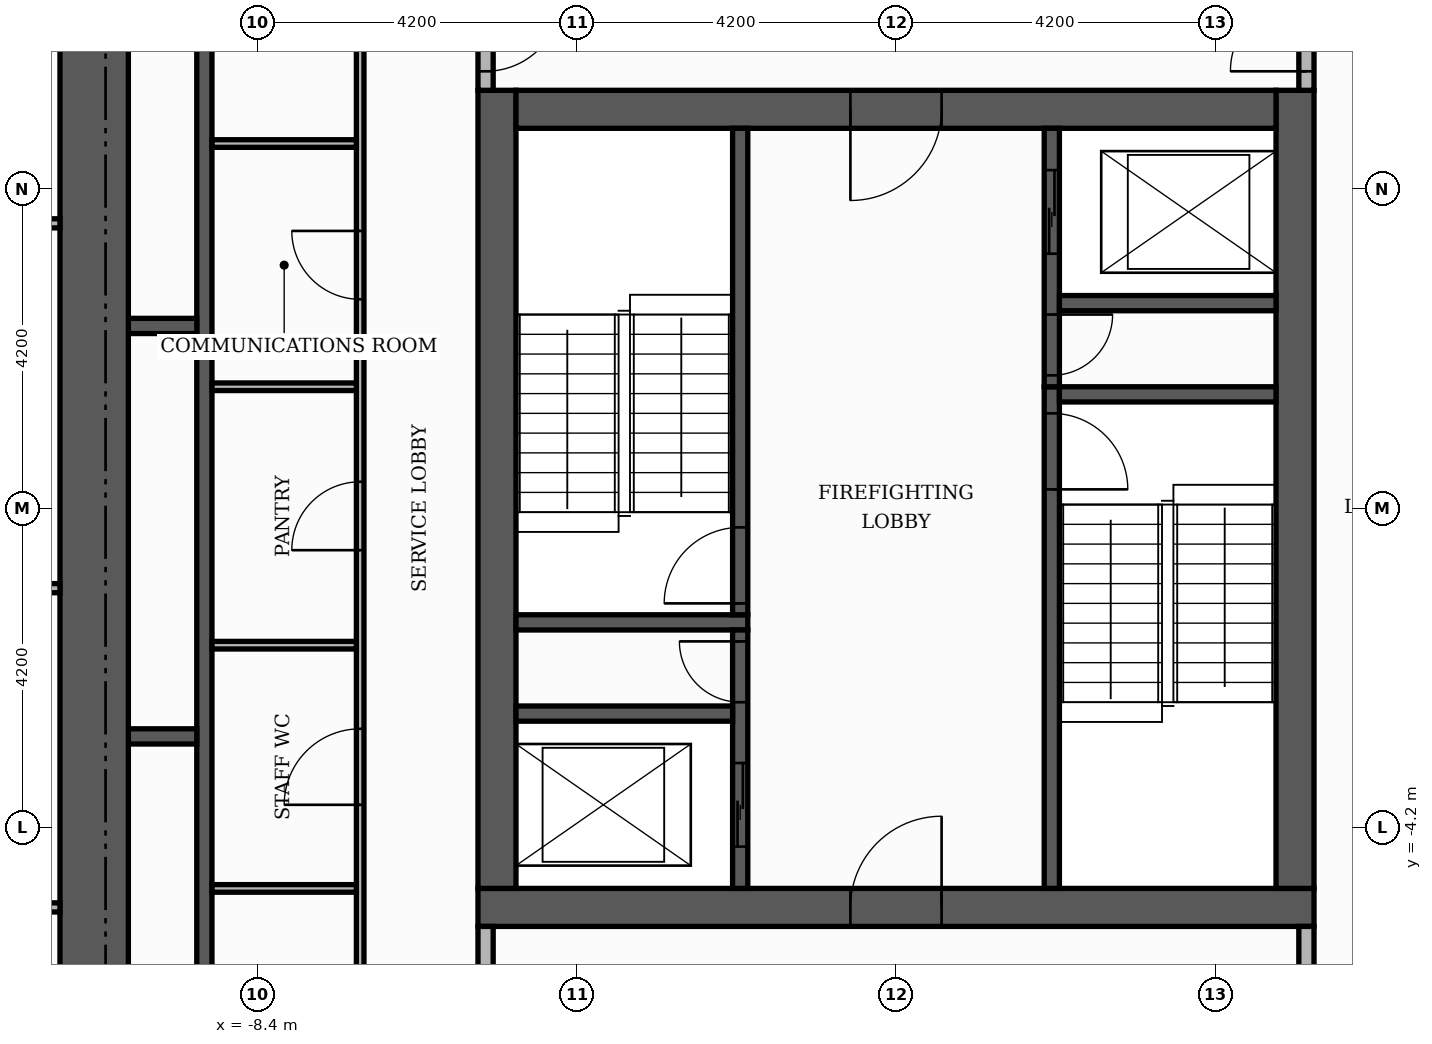
"""IFC4 building model, lengths in metres.
Left out: names, types, materials, properties, quantities, classifications, styles, units other than length and angle.
Written with IfcOpenShell. Run it as: python <this file> out.ifc"""

import sys

from ifc_helpers import new_model, si_unit, direction, frame, frame_2d, origin, place, context, subcontext, project, spatial, rectangle, extrude, element, fill, save


model = new_model("IFC4")
c1 = context("Model", 3, precision=1e-05, world=origin(), true_north=direction((0.0, 1.0)))
c2 = subcontext(c1, "Body", "Model", "MODEL_VIEW")
j1 = project(units=[si_unit("LENGTHUNIT", "METRE"), si_unit("PLANEANGLEUNIT", "RADIAN")], contexts=[c1])
p1 = place(None, origin())
s1 = spatial("IfcSite", under=j1, at=p1, CompositionType="ELEMENT")
p2 = place(p1, origin())
s2 = spatial("IfcBuilding", under=s1, at=p2, CompositionType="ELEMENT")
p3 = place(p2, frame((0.0, 0.0, 244.5)))
s3 = spatial("IfcBuildingStorey", under=s2, at=p3, CompositionType="ELEMENT", Elevation=244.5)
p4 = place(p3, frame((-5.5, -5.25, 0.0), z_axis=(0.0, 0.0, 1.0), x_axis=(1.0, 0.0, 0.0)))
e1 = element("IfcWall", 1, at=p4, inside=s3, PredefinedType="SHEAR", context=c2, shape_type="SweptSolid", body=[
    extrude(rectangle(XDim=11.0, YDim=0.5, at=frame_2d((5.5, 0.0))), origin(), (0.0, 0.0, 1.0), 3.48),
])
p5 = place(p4, frame((4.9, 0.0, 0.0)))
e2 = element("IfcOpeningElement", 2, at=p5, cuts=e1, PredefinedType="OPENING", context=c2, shape_type="SweptSolid", body=[
    extrude(rectangle(XDim=1.2, YDim=2.1, at=frame_2d((0.6, 1.05))), frame((0.0, 0.26, 0.0), z_axis=(0.0, -1.0, 0.0), x_axis=(1.0, 0.0, 0.0)), (0.0, 0.0, 1.0), 0.52),
])
for number, where, z_axis, x_axis in (
    (3, (-5.25, -5.0, 0.0), (0.0, 0.0, 1.0), (0.0, 1.0, 0.0)),
    (4, (5.25, -5.0, 0.0), (0.0, 0.0, 1.0), (0.0, 1.0, 0.0)),
):
    element("IfcWall", number, at=place(p3, frame(where, z_axis=z_axis, x_axis=x_axis)), inside=s3, PredefinedType="SHEAR", context=c2, shape_type="SweptSolid", body=[
        extrude(rectangle(XDim=10.5, YDim=0.5, at=frame_2d((5.25, 0.0))), origin(), (0.0, 0.0, 1.0), 3.48),
    ])
p6 = place(p3, frame((-5.0, 5.25, 0.0), z_axis=(0.0, 0.0, 1.0), x_axis=(1.0, 0.0, 0.0)))
e5 = element("IfcWall", 5, at=p6, inside=s3, PredefinedType="SHEAR", context=c2, shape_type="SweptSolid", body=[
    extrude(rectangle(XDim=10.0, YDim=0.5, at=frame_2d((5.0, 0.0))), origin(), (0.0, 0.0, 1.0), 3.48),
])
p7 = place(p6, frame((4.4, 0.0, 0.0)))
e6 = element("IfcOpeningElement", 6, at=p7, cuts=e5, PredefinedType="OPENING", context=c2, shape_type="SweptSolid", body=[
    extrude(rectangle(XDim=1.2, YDim=2.1, at=frame_2d((0.6, 1.05))), frame((0.0, 0.26, 0.0), z_axis=(0.0, -1.0, 0.0), x_axis=(1.0, 0.0, 0.0)), (0.0, 0.0, 1.0), 0.52),
])
p8 = place(p3, frame((2.05, -5.0, 0.0), z_axis=(0.0, 0.0, 1.0), x_axis=(0.0, 1.0, 0.0)))
e7 = element("IfcWall", 7, at=p8, inside=s3, PredefinedType="SHEAR", context=c2, shape_type="SweptSolid", body=[
    extrude(rectangle(XDim=6.6, YDim=0.2, at=frame_2d((3.3, 0.0))), origin(), (0.0, 0.0, 1.0), 3.48),
])
p9 = place(p8, frame((5.25, 0.0, 0.0)))
e8 = element("IfcOpeningElement", 8, at=p9, cuts=e7, PredefinedType="OPENING", context=c2, shape_type="SweptSolid", body=[
    extrude(rectangle(XDim=1.0, YDim=2.1, at=frame_2d((0.5, 1.05))), frame((0.0, 0.11, 0.0), z_axis=(0.0, -1.0, 0.0), x_axis=(1.0, 0.0, 0.0)), (0.0, 0.0, 1.0), 0.22),
])
p10 = place(p3, frame((-5.0, -1.5, 0.0), z_axis=(0.0, 0.0, 1.0), x_axis=(1.0, 0.0, 0.0)))
e9 = element("IfcWall", 9, at=p10, inside=s3, PredefinedType="SHEAR", context=c2, shape_type="SweptSolid", body=[
    extrude(rectangle(XDim=3.05, YDim=0.2, at=frame_2d((1.525, 0.0))), origin(), (0.0, 0.0, 1.0), 3.48),
])
p11 = place(p3, frame((-2.05, -1.4, 0.0), z_axis=(0.0, 0.0, 1.0), x_axis=(0.0, 1.0, 0.0)))
e10 = element("IfcWall", 10, at=p11, inside=s3, PredefinedType="SHEAR", context=c2, shape_type="SweptSolid", body=[
    extrude(rectangle(XDim=6.4, YDim=0.2, at=frame_2d((3.2, 0.0))), origin(), (0.0, 0.0, 1.0), 3.48),
])
p12 = place(p11, frame((0.15, 0.0, 0.0)))
e11 = element("IfcOpeningElement", 11, at=p12, cuts=e10, PredefinedType="OPENING", context=c2, shape_type="SweptSolid", body=[
    extrude(rectangle(XDim=1.0, YDim=2.1, at=frame_2d((0.5, 1.05))), frame((0.0, 0.11, 0.0), z_axis=(0.0, -1.0, 0.0), x_axis=(1.0, 0.0, 0.0)), (0.0, 0.0, 1.0), 0.22),
])
p13 = place(p3, frame((2.15, 1.5, 0.0), z_axis=(0.0, 0.0, 1.0), x_axis=(1.0, 0.0, 0.0)))
e12 = element("IfcWall", 12, at=p13, inside=s3, PredefinedType="SHEAR", context=c2, shape_type="SweptSolid", body=[
    extrude(rectangle(XDim=2.85, YDim=0.2, at=frame_2d((1.425, 0.0))), origin(), (0.0, 0.0, 1.0), 3.48),
])
p14 = place(p3, frame((-9.1, -8.2, 0.0), z_axis=(0.0, 0.0, 1.0), x_axis=(0.0, 1.0, 0.0)))
e13 = element("IfcWall", 13, at=p14, inside=s3, PredefinedType="SHEAR", context=c2, shape_type="SweptSolid", body=[
    extrude(rectangle(XDim=16.4, YDim=0.2, at=frame_2d((8.2, 0.0))), origin(), (0.0, 0.0, 1.0), 3.48),
])
p15 = place(p3, frame((-2.05, -5.0, 0.0), z_axis=(0.0, 0.0, 1.0), x_axis=(0.0, 1.0, 0.0)))
e14 = element("IfcWall", 14, at=p15, inside=s3, PredefinedType="SHEAR", context=c2, shape_type="SweptSolid", body=[
    extrude(rectangle(XDim=3.4, YDim=0.2, at=frame_2d((1.7, 0.0))), origin(), (0.0, 0.0, 1.0), 3.48),
])
p16 = place(p15, frame((0.55, 0.0, 0.0)))
e15 = element("IfcOpeningElement", 15, at=p16, cuts=e14, PredefinedType="OPENING", context=c2, shape_type="SweptSolid", body=[
    extrude(rectangle(XDim=1.1, YDim=2.1, at=frame_2d((0.55, 1.05))), frame((0.0, 0.11, 0.0), z_axis=(0.0, -1.0, 0.0), x_axis=(1.0, 0.0, 0.0)), (0.0, 0.0, 1.0), 0.22),
])
p17 = place(p15, frame((2.45, 0.0, 0.0)))
e16 = element("IfcOpeningElement", 16, at=p17, cuts=e14, PredefinedType="OPENING", context=c2, shape_type="SweptSolid", body=[
    extrude(rectangle(XDim=0.8, YDim=2.1, at=frame_2d((0.4, 1.05))), frame((0.0, 0.11, 0.0), z_axis=(0.0, -1.0, 0.0), x_axis=(1.0, 0.0, 0.0)), (0.0, 0.0, 1.0), 0.22),
])
p18 = place(p3, frame((-10.1, -3.0, 0.0), z_axis=(0.0, 0.0, 1.0), x_axis=(1.0, 0.0, 0.0)))
e17 = element("IfcWall", 17, at=p18, inside=s3, PredefinedType="SHEAR", context=c2, shape_type="SweptSolid", body=[
    extrude(rectangle(XDim=0.9, YDim=0.2, at=frame_2d((0.45, 0.0))), origin(), (0.0, 0.0, 1.0), 3.48),
])
p19 = place(p3, frame((-5.0, -2.7, 0.0), z_axis=(0.0, 0.0, 1.0), x_axis=(1.0, 0.0, 0.0)))
e18 = element("IfcWall", 18, at=p19, inside=s3, PredefinedType="SHEAR", context=c2, shape_type="SweptSolid", body=[
    extrude(rectangle(XDim=2.85, YDim=0.2, at=frame_2d((1.425, 0.0))), origin(), (0.0, 0.0, 1.0), 3.48),
])
p20 = place(p3, frame((2.05, 1.6, 0.0), z_axis=(0.0, 0.0, 1.0), x_axis=(0.0, 1.0, 0.0)))
e19 = element("IfcWall", 19, at=p20, inside=s3, PredefinedType="SHEAR", context=c2, shape_type="SweptSolid", body=[
    extrude(rectangle(XDim=3.4, YDim=0.2, at=frame_2d((1.7, 0.0))), origin(), (0.0, 0.0, 1.0), 3.48),
])
p21 = place(p20, frame((1.75, 0.0, 0.0)))
e20 = element("IfcOpeningElement", 20, at=p21, cuts=e19, PredefinedType="OPENING", context=c2, shape_type="SweptSolid", body=[
    extrude(rectangle(XDim=1.1, YDim=2.1, at=frame_2d((0.55, 1.05))), frame((0.0, 0.11, 0.0), z_axis=(0.0, -1.0, 0.0), x_axis=(1.0, 0.0, 0.0)), (0.0, 0.0, 1.0), 0.22),
])
p22 = place(p20, frame((0.15, 0.0, 0.0)))
e21 = element("IfcOpeningElement", 21, at=p22, cuts=e19, PredefinedType="OPENING", context=c2, shape_type="SweptSolid", body=[
    extrude(rectangle(XDim=0.8, YDim=2.1, at=frame_2d((0.4, 1.05))), frame((0.0, 0.11, 0.0), z_axis=(0.0, -1.0, 0.0), x_axis=(1.0, 0.0, 0.0)), (0.0, 0.0, 1.0), 0.22),
])
p23 = place(p3, frame((-10.1, 2.4, 0.0), z_axis=(0.0, 0.0, 1.0), x_axis=(1.0, 0.0, 0.0)))
e22 = element("IfcWall", 22, at=p23, inside=s3, PredefinedType="SHEAR", context=c2, shape_type="SweptSolid", body=[
    extrude(rectangle(XDim=0.9, YDim=0.2, at=frame_2d((0.45, 0.0))), origin(), (0.0, 0.0, 1.0), 3.48),
])
p24 = place(p3, frame((2.15, 2.7, 0.0), z_axis=(0.0, 0.0, 1.0), x_axis=(1.0, 0.0, 0.0)))
e23 = element("IfcWall", 23, at=p24, inside=s3, PredefinedType="SHEAR", context=c2, shape_type="SweptSolid", body=[
    extrude(rectangle(XDim=2.85, YDim=0.2, at=frame_2d((1.425, 0.0))), origin(), (0.0, 0.0, 1.0), 3.48),
])
p25 = place(p3, frame((-10.55, -10.1, 0.0), z_axis=(0.0, 0.0, 1.0), x_axis=(0.0, 1.0, 0.0)))
e24 = element("IfcWall", 24, at=p25, inside=s3, PredefinedType="SHEAR", context=c2, shape_type="SweptSolid", body=[
    extrude(rectangle(XDim=20.2, YDim=0.9, at=frame_2d((10.1, 0.0))), origin(), (0.0, 0.0, 1.0), 3.48),
])
p26 = place(p3, frame((-5.4, -10.1, 0.0), z_axis=(0.0, 0.0, 1.0), x_axis=(0.0, 1.0, 0.0)))
e25 = element("IfcWall", 25, at=p26, inside=s3, PredefinedType="PARTITIONING", context=c2, shape_type="SweptSolid", body=[
    extrude(rectangle(XDim=4.6, YDim=0.2, at=frame_2d((2.3, 0.0))), origin(), (0.0, 0.0, 1.0), 3.48),
])
p27 = place(p26, frame((2.9, 0.0, 0.0)))
e26 = element("IfcOpeningElement", 26, at=p27, cuts=e25, PredefinedType="OPENING", context=c2, shape_type="SweptSolid", body=[
    extrude(rectangle(XDim=1.0, YDim=2.1, at=frame_2d((0.5, 1.05))), frame((0.0, 0.11, 0.0), z_axis=(0.0, -1.0, 0.0), x_axis=(1.0, 0.0, 0.0)), (0.0, 0.0, 1.0), 0.22),
])
p28 = place(p3, frame((5.4, -10.1, 0.0), z_axis=(0.0, 0.0, 1.0), x_axis=(0.0, 1.0, 0.0)))
e27 = element("IfcWall", 27, at=p28, inside=s3, PredefinedType="PARTITIONING", context=c2, shape_type="SweptSolid", body=[
    extrude(rectangle(XDim=4.6, YDim=0.2, at=frame_2d((2.3, 0.0))), origin(), (0.0, 0.0, 1.0), 3.48),
])
p29 = place(p28, frame((2.9, 0.0, 0.0)))
e28 = element("IfcOpeningElement", 28, at=p29, cuts=e27, PredefinedType="OPENING", context=c2, shape_type="SweptSolid", body=[
    extrude(rectangle(XDim=1.0, YDim=2.1, at=frame_2d((0.5, 1.05))), frame((0.0, 0.11, 0.0), z_axis=(0.0, -1.0, 0.0), x_axis=(1.0, 0.0, 0.0)), (0.0, 0.0, 1.0), 0.22),
])
p30 = place(p3, frame((-7.05, -8.2, 0.0), z_axis=(0.0, 0.0, 1.0), x_axis=(0.0, 1.0, 0.0)))
e29 = element("IfcWall", 29, at=p30, inside=s3, PredefinedType="PARTITIONING", context=c2, shape_type="SweptSolid", body=[
    extrude(rectangle(XDim=16.4, YDim=0.1, at=frame_2d((8.2, 0.0))), origin(), (0.0, 0.0, 1.0), 3.48),
])
p31 = place(p30, frame((1.15, 0.0, 0.0)))
e30 = element("IfcOpeningElement", 30, at=p31, cuts=e29, PredefinedType="OPENING", context=c2, shape_type="SweptSolid", body=[
    extrude(rectangle(XDim=0.9, YDim=2.1, at=frame_2d((0.45, 1.05))), frame((0.0, 0.06, 0.0), z_axis=(0.0, -1.0, 0.0), x_axis=(1.0, 0.0, 0.0)), (0.0, 0.0, 1.0), 0.12),
])
p32 = place(p30, frame((4.3, 0.0, 0.0)))
e31 = element("IfcOpeningElement", 31, at=p32, cuts=e29, PredefinedType="OPENING", context=c2, shape_type="SweptSolid", body=[
    extrude(rectangle(XDim=1.0, YDim=2.1, at=frame_2d((0.5, 1.05))), frame((0.0, 0.06, 0.0), z_axis=(0.0, -1.0, 0.0), x_axis=(1.0, 0.0, 0.0)), (0.0, 0.0, 1.0), 0.12),
])
p33 = place(p30, frame((7.65, 0.0, 0.0)))
e32 = element("IfcOpeningElement", 32, at=p33, cuts=e29, PredefinedType="OPENING", context=c2, shape_type="SweptSolid", body=[
    extrude(rectangle(XDim=0.9, YDim=2.1, at=frame_2d((0.45, 1.05))), frame((0.0, 0.06, 0.0), z_axis=(0.0, -1.0, 0.0), x_axis=(1.0, 0.0, 0.0)), (0.0, 0.0, 1.0), 0.12),
])
p34 = place(p30, frame((10.95, 0.0, 0.0)))
e33 = element("IfcOpeningElement", 33, at=p34, cuts=e29, PredefinedType="OPENING", context=c2, shape_type="SweptSolid", body=[
    extrude(rectangle(XDim=0.9, YDim=2.1, at=frame_2d((0.45, 1.05))), frame((0.0, 0.06, 0.0), z_axis=(0.0, -1.0, 0.0), x_axis=(1.0, 0.0, 0.0)), (0.0, 0.0, 1.0), 0.12),
])
p35 = place(p30, frame((14.25, 0.0, 0.0)))
e34 = element("IfcOpeningElement", 34, at=p35, cuts=e29, PredefinedType="OPENING", context=c2, shape_type="SweptSolid", body=[
    extrude(rectangle(XDim=0.9, YDim=2.1, at=frame_2d((0.45, 1.05))), frame((0.0, 0.06, 0.0), z_axis=(0.0, -1.0, 0.0), x_axis=(1.0, 0.0, 0.0)), (0.0, 0.0, 1.0), 0.12),
])
for number, where, z_axis, x_axis in (
    (35, (-9.0, -5.0, 0.0), (0.0, 0.0, 1.0), (1.0, 0.0, 0.0)),
    (36, (-9.0, -1.8, 0.0), (0.0, 0.0, 1.0), (1.0, 0.0, 0.0)),
    (37, (-9.0, 1.6, 0.0), (0.0, 0.0, 1.0), (1.0, 0.0, 0.0)),
    (38, (-9.0, 4.8, 0.0), (0.0, 0.0, 1.0), (1.0, 0.0, 0.0)),
):
    element("IfcWall", number, at=place(p3, frame(where, z_axis=z_axis, x_axis=x_axis)), inside=s3, PredefinedType="PARTITIONING", context=c2, shape_type="SweptSolid", body=[
        extrude(rectangle(XDim=1.9, YDim=0.1, at=frame_2d((0.95, 0.0))), origin(), (0.0, 0.0, 1.0), 3.48),
    ])
p36 = place(p3, frame((-5.4, 5.5, 0.0), z_axis=(0.0, 0.0, 1.0), x_axis=(0.0, 1.0, 0.0)))
e39 = element("IfcWall", 39, at=p36, inside=s3, PredefinedType="PARTITIONING", context=c2, shape_type="SweptSolid", body=[
    extrude(rectangle(XDim=1.55, YDim=0.2, at=frame_2d((0.775, 0.0))), origin(), (0.0, 0.0, 1.0), 3.48),
])
p37 = place(p36, frame((0.25, 0.0, 0.0)))
e40 = element("IfcOpeningElement", 40, at=p37, cuts=e39, PredefinedType="OPENING", context=c2, shape_type="SweptSolid", body=[
    extrude(rectangle(XDim=1.0, YDim=2.1, at=frame_2d((0.5, 1.05))), frame((0.0, 0.11, 0.0), z_axis=(0.0, -1.0, 0.0), x_axis=(1.0, 0.0, 0.0)), (0.0, 0.0, 1.0), 0.22),
])
p38 = place(p3, frame((5.4, 5.5, 0.0), z_axis=(0.0, 0.0, 1.0), x_axis=(0.0, 1.0, 0.0)))
e41 = element("IfcWall", 41, at=p38, inside=s3, PredefinedType="PARTITIONING", context=c2, shape_type="SweptSolid", body=[
    extrude(rectangle(XDim=4.6, YDim=0.2, at=frame_2d((2.3, 0.0))), origin(), (0.0, 0.0, 1.0), 3.48),
])
p39 = place(p38, frame((0.25, 0.0, 0.0)))
e42 = element("IfcOpeningElement", 42, at=p39, cuts=e41, PredefinedType="OPENING", context=c2, shape_type="SweptSolid", body=[
    extrude(rectangle(XDim=1.0, YDim=2.1, at=frame_2d((0.5, 1.05))), frame((0.0, 0.11, 0.0), z_axis=(0.0, -1.0, 0.0), x_axis=(1.0, 0.0, 0.0)), (0.0, 0.0, 1.0), 0.22),
])
for number, where, z_axis, x_axis in (
    (43, (-18.32, -5.25, 0.0), (0.0, 0.0, 1.0), (1.0, 0.0, 0.0)),
    (44, (-18.32, -1.05, 0.0), (0.0, 0.0, 1.0), (1.0, 0.0, 0.0)),
    (45, (-18.32, 3.75, 0.0), (0.0, 0.0, 1.0), (1.0, 0.0, 0.0)),
):
    element("IfcWall", number, at=place(p3, frame(where, z_axis=z_axis, x_axis=x_axis)), inside=s3, PredefinedType="PARTITIONING", context=c2, shape_type="SweptSolid", body=[
        extrude(rectangle(XDim=7.32, YDim=0.12, at=frame_2d((3.66, 0.0))), origin(), (0.0, 0.0, 1.0), 3.48),
    ])
p40 = place(p21, origin())
e46 = element("IfcDoor", 46, at=p40, inside=s3, OperationType="SLIDING_TO_LEFT", PredefinedType="DOOR", context=c2, shape_type="SweptSolid", body=[
    extrude(rectangle(XDim=1.1, YDim=2.1, at=frame_2d((0.55, 1.05))), frame((0.0, 0.025, 0.0), z_axis=(0.0, -1.0, 0.0), x_axis=(1.0, 0.0, 0.0)), (0.0, 0.0, 1.0), 0.05),
])
fill(e20, e46)
p41 = place(p16, origin())
e47 = element("IfcDoor", 47, at=p41, inside=s3, OperationType="SLIDING_TO_LEFT", PredefinedType="DOOR", context=c2, shape_type="SweptSolid", body=[
    extrude(rectangle(XDim=1.1, YDim=2.1, at=frame_2d((0.55, 1.05))), frame((0.0, 0.025, 0.0), z_axis=(0.0, -1.0, 0.0), x_axis=(1.0, 0.0, 0.0)), (0.0, 0.0, 1.0), 0.05),
])
fill(e15, e47)
p42 = place(p12, origin())
e48 = element("IfcDoor", 48, at=p42, inside=s3, OperationType="SINGLE_SWING_LEFT", PredefinedType="DOOR", context=c2, shape_type="SweptSolid", body=[
    extrude(rectangle(XDim=1.0, YDim=2.1, at=frame_2d((0.5, 1.05))), frame((0.0, 0.025, 0.0), z_axis=(0.0, -1.0, 0.0), x_axis=(1.0, 0.0, 0.0)), (0.0, 0.0, 1.0), 0.05),
])
fill(e11, e48)
p43 = place(p9, frame((1.0, 0.0, 0.0), z_axis=(0.0, 0.0, 1.0), x_axis=(-1.0, 0.0, 0.0)))
e49 = element("IfcDoor", 49, at=p43, inside=s3, OperationType="SINGLE_SWING_LEFT", PredefinedType="DOOR", context=c2, shape_type="SweptSolid", body=[
    extrude(rectangle(XDim=1.0, YDim=2.1, at=frame_2d((0.5, 1.05))), frame((0.0, 0.025, 0.0), z_axis=(0.0, -1.0, 0.0), x_axis=(1.0, 0.0, 0.0)), (0.0, 0.0, 1.0), 0.05),
])
fill(e8, e49)
p44 = place(p22, frame((0.8, 0.0, 0.0), z_axis=(0.0, 0.0, 1.0), x_axis=(-1.0, 0.0, 0.0)))
e50 = element("IfcDoor", 50, at=p44, inside=s3, OperationType="SINGLE_SWING_RIGHT", PredefinedType="DOOR", context=c2, shape_type="SweptSolid", body=[
    extrude(rectangle(XDim=0.8, YDim=2.1, at=frame_2d((0.4, 1.05))), frame((0.0, 0.025, 0.0), z_axis=(0.0, -1.0, 0.0), x_axis=(1.0, 0.0, 0.0)), (0.0, 0.0, 1.0), 0.05),
])
fill(e21, e50)
p45 = place(p17, origin())
e51 = element("IfcDoor", 51, at=p45, inside=s3, OperationType="SINGLE_SWING_RIGHT", PredefinedType="DOOR", context=c2, shape_type="SweptSolid", body=[
    extrude(rectangle(XDim=0.8, YDim=2.1, at=frame_2d((0.4, 1.05))), frame((0.0, 0.025, 0.0), z_axis=(0.0, -1.0, 0.0), x_axis=(1.0, 0.0, 0.0)), (0.0, 0.0, 1.0), 0.05),
])
fill(e16, e51)
p46 = place(p7, frame((1.2, 0.0, 0.0), z_axis=(0.0, 0.0, 1.0), x_axis=(-1.0, 0.0, 0.0)))
e52 = element("IfcDoor", 52, at=p46, inside=s3, OperationType="SINGLE_SWING_LEFT", PredefinedType="DOOR", context=c2, shape_type="SweptSolid", body=[
    extrude(rectangle(XDim=1.2, YDim=2.1, at=frame_2d((0.6, 1.05))), frame((0.0, 0.025, 0.0), z_axis=(0.0, -1.0, 0.0), x_axis=(1.0, 0.0, 0.0)), (0.0, 0.0, 1.0), 0.05),
])
fill(e6, e52)
p47 = place(p5, origin())
e53 = element("IfcDoor", 53, at=p47, inside=s3, OperationType="SINGLE_SWING_RIGHT", PredefinedType="DOOR", context=c2, shape_type="SweptSolid", body=[
    extrude(rectangle(XDim=1.2, YDim=2.1, at=frame_2d((0.6, 1.05))), frame((0.0, 0.025, 0.0), z_axis=(0.0, -1.0, 0.0), x_axis=(1.0, 0.0, 0.0)), (0.0, 0.0, 1.0), 0.05),
])
fill(e2, e53)
p48 = place(p37, frame((1.0, 0.0, 0.0), z_axis=(0.0, 0.0, 1.0), x_axis=(-1.0, 0.0, 0.0)))
e54 = element("IfcDoor", 54, at=p48, inside=s3, OperationType="SINGLE_SWING_RIGHT", PredefinedType="DOOR", context=c2, shape_type="SweptSolid", body=[
    extrude(rectangle(XDim=1.0, YDim=2.1, at=frame_2d((0.5, 1.05))), frame((0.0, 0.025, 0.0), z_axis=(0.0, -1.0, 0.0), x_axis=(1.0, 0.0, 0.0)), (0.0, 0.0, 1.0), 0.05),
])
fill(e40, e54)
p49 = place(p39, origin())
e55 = element("IfcDoor", 55, at=p49, inside=s3, OperationType="SINGLE_SWING_LEFT", PredefinedType="DOOR", context=c2, shape_type="SweptSolid", body=[
    extrude(rectangle(XDim=1.0, YDim=2.1, at=frame_2d((0.5, 1.05))), frame((0.0, 0.025, 0.0), z_axis=(0.0, -1.0, 0.0), x_axis=(1.0, 0.0, 0.0)), (0.0, 0.0, 1.0), 0.05),
])
fill(e42, e55)
p50 = place(p32, origin())
e56 = element("IfcDoor", 56, at=p50, inside=s3, OperationType="SINGLE_SWING_LEFT", PredefinedType="DOOR", context=c2, shape_type="SweptSolid", body=[
    extrude(rectangle(XDim=1.0, YDim=2.1, at=frame_2d((0.5, 1.05))), frame((0.0, 0.025, 0.0), z_axis=(0.0, -1.0, 0.0), x_axis=(1.0, 0.0, 0.0)), (0.0, 0.0, 1.0), 0.05),
])
fill(e31, e56)
p51 = place(p33, origin())
e57 = element("IfcDoor", 57, at=p51, inside=s3, OperationType="SINGLE_SWING_LEFT", PredefinedType="DOOR", context=c2, shape_type="SweptSolid", body=[
    extrude(rectangle(XDim=0.9, YDim=2.1, at=frame_2d((0.45, 1.05))), frame((0.0, 0.025, 0.0), z_axis=(0.0, -1.0, 0.0), x_axis=(1.0, 0.0, 0.0)), (0.0, 0.0, 1.0), 0.05),
])
fill(e32, e57)
p52 = place(p34, origin())
e58 = element("IfcDoor", 58, at=p52, inside=s3, OperationType="SINGLE_SWING_RIGHT", PredefinedType="DOOR", context=c2, shape_type="SweptSolid", body=[
    extrude(rectangle(XDim=0.9, YDim=2.1, at=frame_2d((0.45, 1.05))), frame((0.0, 0.025, 0.0), z_axis=(0.0, -1.0, 0.0), x_axis=(1.0, 0.0, 0.0)), (0.0, 0.0, 1.0), 0.05),
])
fill(e33, e58)
save(model, sys.argv[1])
